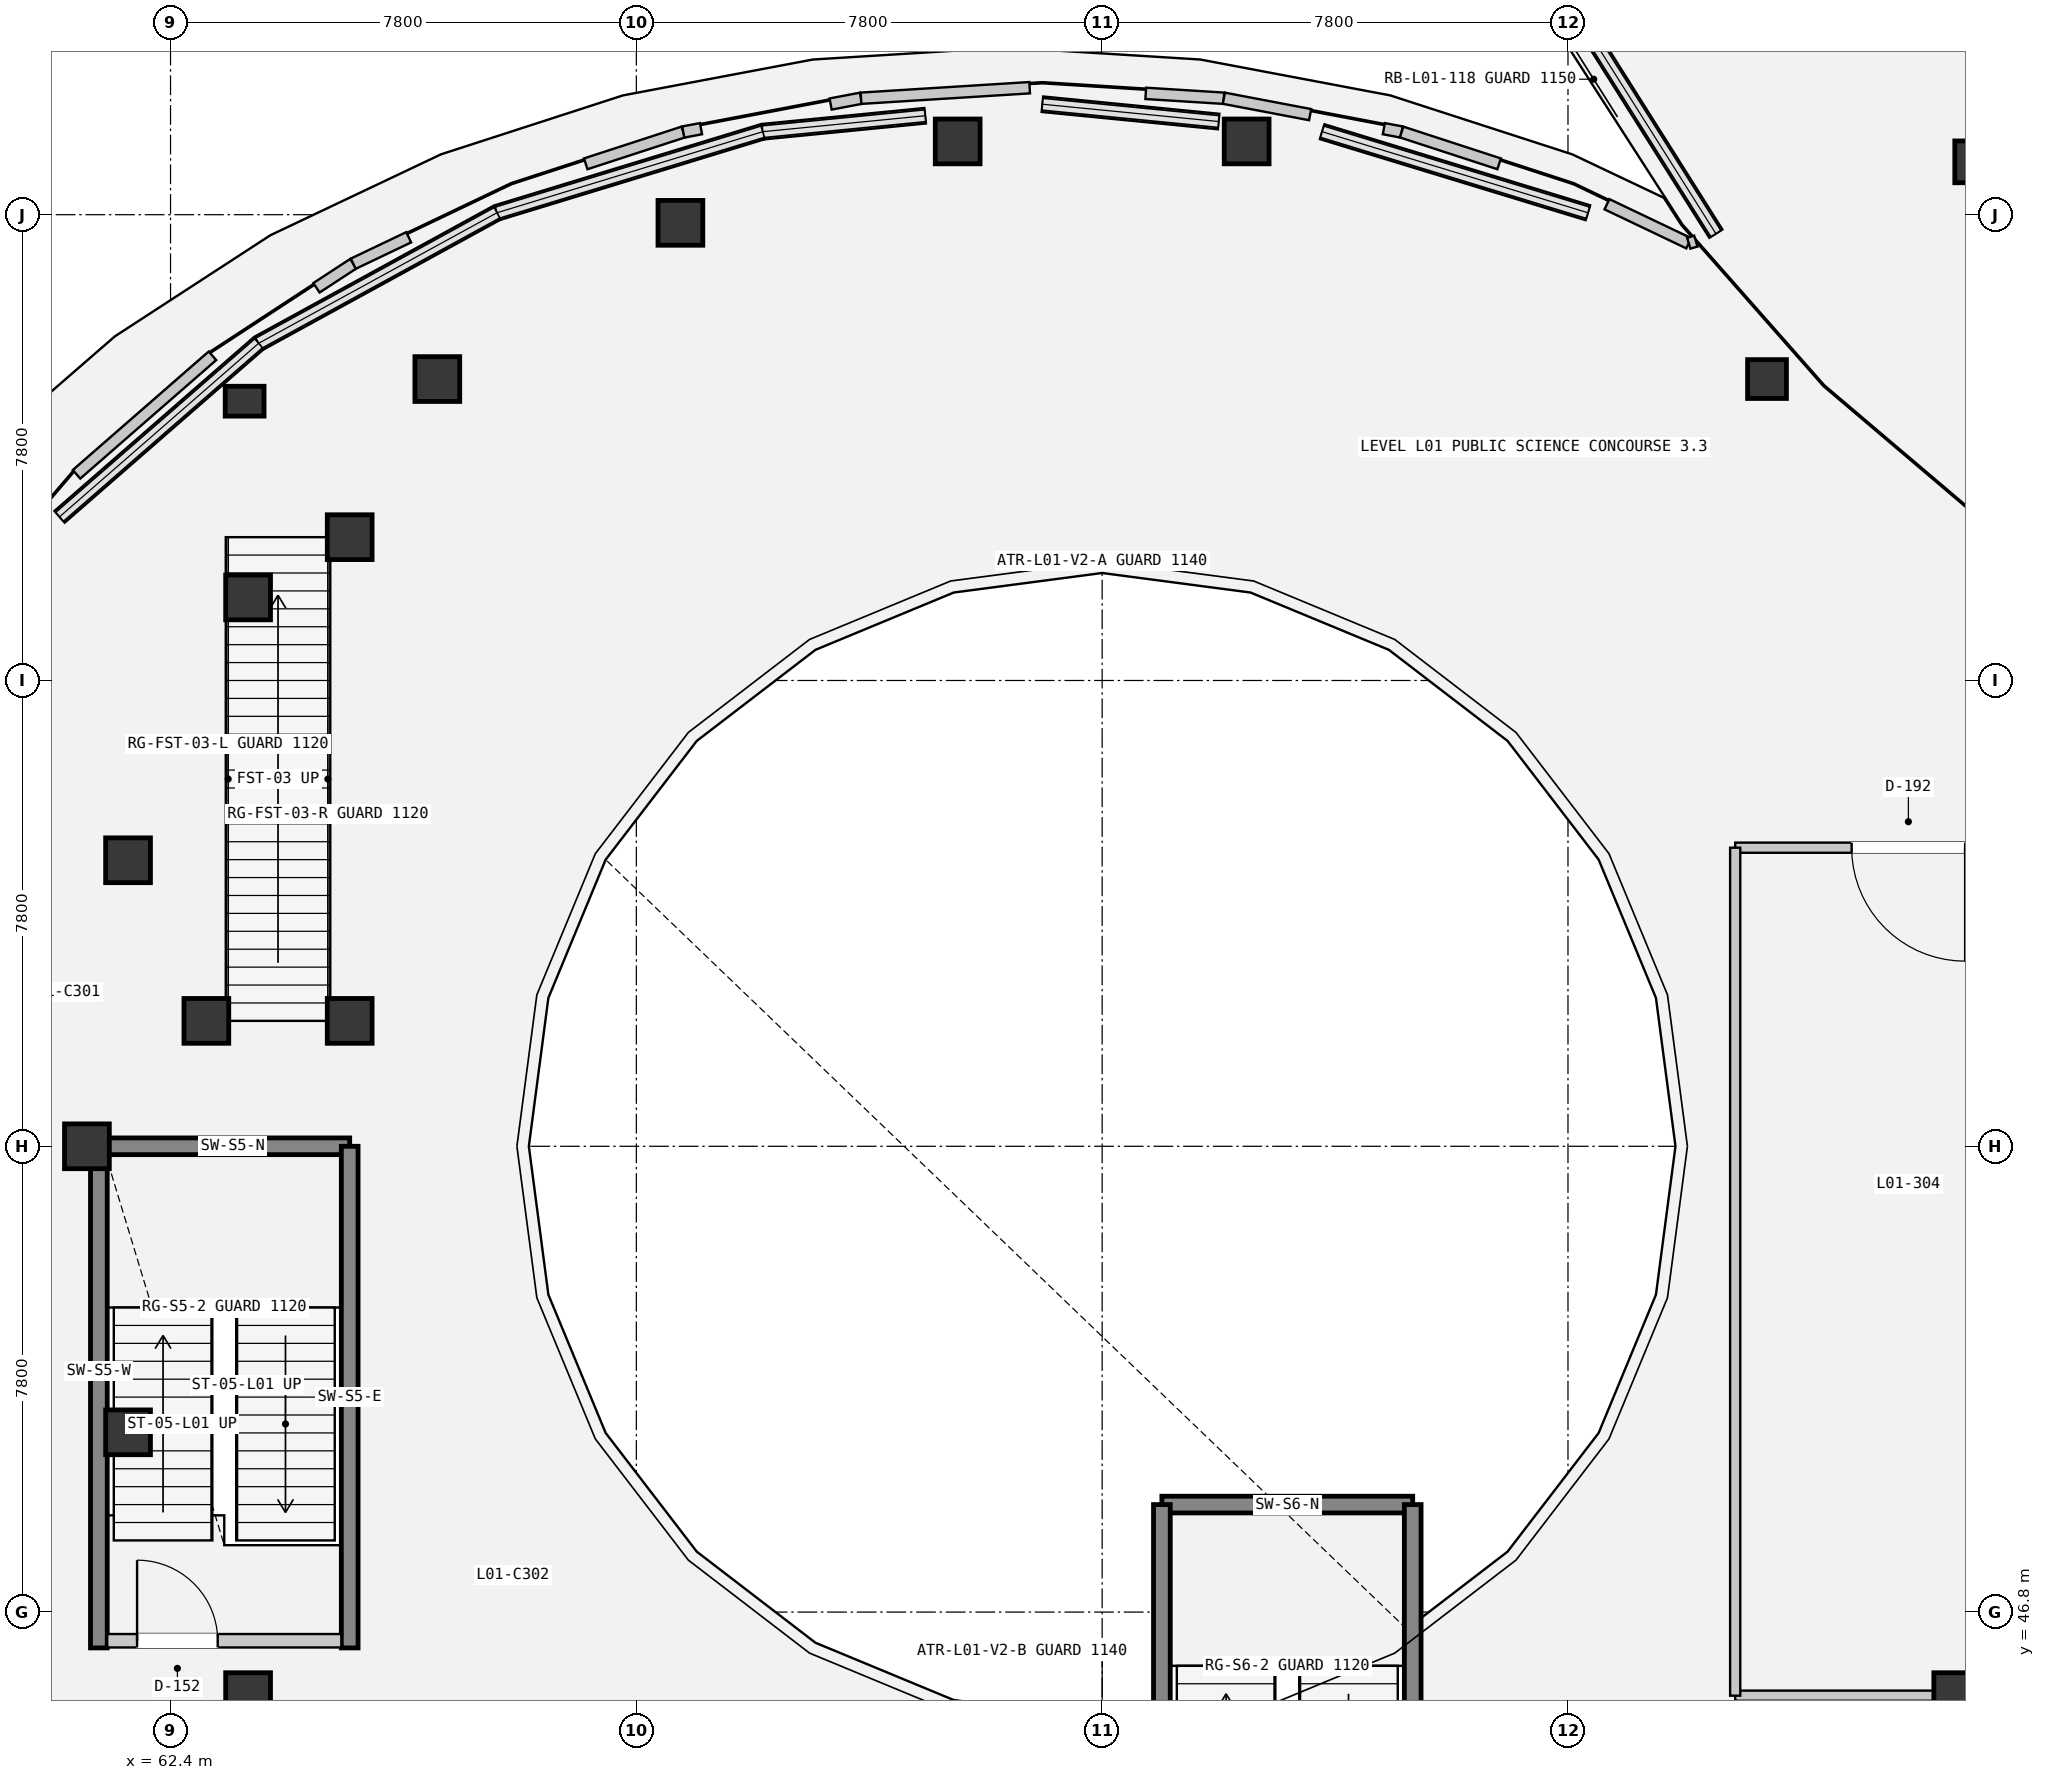
"""IFC4 building model, lengths in metres.
Left out: names, types, materials, properties, quantities, classifications, styles, units other than length and angle.
Written with IfcOpenShell. Run it as: python <this file> out.ifc"""

import sys

from ifc_helpers import new_model, si_unit, direction, frame, frame_2d, origin, origin_2d, place, context, subcontext, project, spatial, rectangle, circle, extrude, element, fill, save


model = new_model("IFC4")
c1 = context("Model", 3, precision=1e-05, world=origin(), true_north=direction((0.0, 1.0)))
c2 = subcontext(c1, "Body", "Model", "MODEL_VIEW")
j1 = project(units=[si_unit("LENGTHUNIT", "METRE"), si_unit("PLANEANGLEUNIT", "RADIAN")], contexts=[c1])
p1 = place(None, origin())
s1 = spatial("IfcSite", under=j1, at=p1, CompositionType="ELEMENT")
p2 = place(p1, origin())
s2 = spatial("IfcBuilding", under=s1, at=p2, CompositionType="ELEMENT")
p3 = place(p2, frame((0.0, 0.0, 5.4)))
s3 = spatial("IfcBuildingStorey", under=s2, at=p3, CompositionType="ELEMENT", Elevation=5.4)
p4 = place(p3, frame((89.133, 67.448, 0.0), z_axis=(0.0, 0.0, 1.0), x_axis=(1.0, 0.0, 0.0)))
e1 = element("IfcColumn", 1, at=p4, inside=s3, PredefinedType="COLUMN", context=c2, shape_type="SweptSolid", body=[
    extrude(circle(Radius=0.325, at=origin_2d()), origin(), (0.0, 0.0, 1.0), 4.8),
])
for number, where, z_axis, x_axis in (
    (2, (80.419, 71.427, 0.0), (0.0, 0.0, 1.0), (1.0, 0.0, 0.0)),
    (3, (75.581, 71.427, 0.0), (0.0, 0.0, 1.0), (1.0, 0.0, 0.0)),
    (4, (70.938, 70.064, 0.0), (0.0, 0.0, 1.0), (1.0, 0.0, 0.0)),
    (5, (66.867, 67.448, 0.0), (0.0, 0.0, 1.0), (1.0, 0.0, 0.0)),
    (6, (63.699, 63.791, 0.0), (0.0, 0.0, 1.0), (1.0, 0.0, 0.0)),
    (7, (61.689, 59.389, 0.0), (0.0, 0.0, 1.0), (1.0, 0.0, 0.0)),
    (8, (61.0, 54.6, 0.0), (0.0, 0.0, 1.0), (1.0, 0.0, 0.0)),
    (9, (61.689, 49.811, 0.0), (0.0, 0.0, 1.0), (1.0, 0.0, 0.0)),
    (10, (63.699, 45.409, 0.0), (0.0, 0.0, 1.0), (1.0, 0.0, 0.0)),
    (11, (92.301, 45.409, 0.0), (0.0, 0.0, 1.0), (1.0, 0.0, 0.0)),
):
    element("IfcColumn", number, at=place(p3, frame(where, z_axis=z_axis, x_axis=x_axis)), inside=s3, PredefinedType="COLUMN", context=c2, shape_type="SweptSolid", body=[
        extrude(circle(Radius=0.375, at=origin_2d()), origin(), (0.0, 0.0, 1.0), 4.8),
    ])
p5 = place(p3, frame((92.627, 71.085, 0.0), z_axis=(0.0, 0.0, 1.0), x_axis=(1.0, 0.0, 0.0)))
e12 = element("IfcColumn", 12, at=p5, inside=s3, PredefinedType="COLUMN", context=c2, shape_type="SweptSolid", body=[
    extrude(rectangle(XDim=0.7, YDim=0.7, at=origin_2d()), origin(), (0.0, 0.0, 1.0), 4.8),
])
p6 = place(p3, frame((63.641, 67.077, 0.0), z_axis=(0.0, 0.0, 1.0), x_axis=(1.0, 0.0, 0.0)))
e13 = element("IfcColumn", 13, at=p6, inside=s3, PredefinedType="COLUMN", context=c2, shape_type="SweptSolid", body=[
    extrude(rectangle(XDim=0.65, YDim=0.5, at=origin_2d()), origin(), (0.0, 0.0, 1.0), 4.8),
])
for number, where, z_axis, x_axis in (
    (14, (63.0, 56.7, 0.0), (0.0, 0.0, 1.0), (1.0, 0.0, 0.0)),
    (15, (65.4, 56.7, 0.0), (0.0, 0.0, 1.0), (1.0, 0.0, 0.0)),
    (16, (65.4, 64.8, 0.0), (0.0, 0.0, 1.0), (1.0, 0.0, 0.0)),
):
    element("IfcColumn", number, at=place(p3, frame(where, z_axis=z_axis, x_axis=x_axis)), inside=s3, PredefinedType="COLUMN", context=c2, shape_type="SweptSolid", body=[
        extrude(rectangle(XDim=0.75, YDim=0.75, at=origin_2d()), origin(), (0.0, 0.0, 1.0), 4.8),
    ])
p7 = place(p3, frame((61.2, 54.6, 0.0), z_axis=(0.0, 0.0, 1.0), x_axis=(1.0, 0.0, 0.0)))
e17 = element("IfcWall", 17, at=p7, inside=s3, PredefinedType="SHEAR", context=c2, shape_type="SweptSolid", body=[
    extrude(rectangle(XDim=4.2, YDim=0.28, at=frame_2d((2.1, 0.0))), origin(), (0.0, 0.0, 1.0), 4.8),
])
for number, where, z_axis, x_axis in (
    (18, (61.2, 46.2, 0.0), (0.0, 0.0, 1.0), (0.0, 1.0, 0.0)),
    (19, (65.4, 46.2, 0.0), (0.0, 0.0, 1.0), (0.0, 1.0, 0.0)),
):
    element("IfcWall", number, at=place(p3, frame(where, z_axis=z_axis, x_axis=x_axis)), inside=s3, PredefinedType="SHEAR", context=c2, shape_type="SweptSolid", body=[
        extrude(rectangle(XDim=8.4, YDim=0.28, at=frame_2d((4.2, 0.0))), origin(), (0.0, 0.0, 1.0), 4.8),
    ])
p8 = place(p3, frame((79.0, 48.6, 0.0), z_axis=(0.0, 0.0, 1.0), x_axis=(1.0, 0.0, 0.0)))
e20 = element("IfcWall", 20, at=p8, inside=s3, PredefinedType="SHEAR", context=c2, shape_type="SweptSolid", body=[
    extrude(rectangle(XDim=4.2, YDim=0.28, at=frame_2d((2.1, 0.0))), origin(), (0.0, 0.0, 1.0), 4.8),
])
for number, where, z_axis, x_axis in (
    (21, (79.0, 40.2, 0.0), (0.0, 0.0, 1.0), (0.0, 1.0, 0.0)),
    (22, (83.2, 40.2, 0.0), (0.0, 0.0, 1.0), (0.0, 1.0, 0.0)),
):
    element("IfcWall", number, at=place(p3, frame(where, z_axis=z_axis, x_axis=x_axis)), inside=s3, PredefinedType="SHEAR", context=c2, shape_type="SweptSolid", body=[
        extrude(rectangle(XDim=8.4, YDim=0.28, at=frame_2d((4.2, 0.0))), origin(), (0.0, 0.0, 1.0), 4.8),
    ])
p9 = place(p3, frame((86.133, 70.233, 0.0), z_axis=(0.0, 0.0, 1.0), x_axis=(-0.956504637963, 0.291717119063, 0.0)))
e23 = element("IfcWall", 23, at=p9, inside=s3, PredefinedType="SOLIDWALL", context=c2, shape_type="SweptSolid", body=[
    extrude(rectangle(XDim=4.652, YDim=0.26, at=frame_2d((2.326, 0.0))), origin(), (0.0, 0.0, 1.0), 1.02),
])
p10 = place(p3, frame((79.95, 71.76, 0.0), z_axis=(0.0, 0.0, 1.0), x_axis=(-0.99520858599, 0.097774589602, 0.0)))
e24 = element("IfcWall", 24, at=p10, inside=s3, PredefinedType="SOLIDWALL", context=c2, shape_type="SweptSolid", body=[
    extrude(rectangle(XDim=2.964, YDim=0.26, at=frame_2d((1.482, 0.0))), origin(), (0.0, 0.0, 1.0), 1.02),
])
p11 = place(p3, frame((75.036, 71.857, 0.0), z_axis=(0.0, 0.0, 1.0), x_axis=(-0.99520468372, -0.097814301111, 0.0)))
e25 = element("IfcWall", 25, at=p11, inside=s3, PredefinedType="SOLIDWALL", context=c2, shape_type="SweptSolid", body=[
    extrude(rectangle(XDim=2.733, YDim=0.26, at=frame_2d((1.367, 0.0))), origin(), (0.0, 0.0, 1.0), 1.02),
])
p12 = place(p3, frame((72.316, 71.59, 0.0), z_axis=(0.0, 0.0, 1.0), x_axis=(-0.956504637963, -0.291717119063, 0.0)))
e26 = element("IfcWall", 26, at=p12, inside=s3, PredefinedType="SOLIDWALL", context=c2, shape_type="SweptSolid", body=[
    extrude(rectangle(XDim=4.652, YDim=0.26, at=frame_2d((2.326, 0.0))), origin(), (0.0, 0.0, 1.0), 1.02),
])
p13 = place(p3, frame((67.867, 70.233, 0.0), z_axis=(0.0, 0.0, 1.0), x_axis=(-0.877039221063, -0.480418780562, 0.0)))
e27 = element("IfcWall", 27, at=p13, inside=s3, PredefinedType="SOLIDWALL", context=c2, shape_type="SweptSolid", body=[
    extrude(rectangle(XDim=4.551, YDim=0.26, at=frame_2d((2.275, 0.0))), origin(), (0.0, 0.0, 1.0), 1.02),
])
p14 = place(p3, frame((63.875, 68.047, 0.0), z_axis=(0.0, 0.0, 1.0), x_axis=(-0.75379306643, -0.657111872516, 0.0)))
e28 = element("IfcWall", 28, at=p14, inside=s3, PredefinedType="SOLIDWALL", context=c2, shape_type="SweptSolid", body=[
    extrude(rectangle(XDim=4.422, YDim=0.26, at=frame_2d((2.211, 0.0))), origin(), (0.0, 0.0, 1.0), 1.02),
])
p15 = place(p3, frame((85.74, 73.903, 0.0), z_axis=(0.0, 0.0, 1.0), x_axis=(0.533687611515, -0.845681697399, 0.0)))
e29 = element("IfcWall", 29, at=p15, inside=s3, PredefinedType="SOLIDWALL", context=c2, shape_type="SweptSolid", body=[
    extrude(rectangle(XDim=4.753, YDim=0.26, at=frame_2d((2.376, 0.0))), origin(), (0.0, 0.0, 1.0), 1.02),
])
p16 = place(p3, frame((61.34, 46.32, 0.0), z_axis=(0.0, 0.0, 1.0), x_axis=(1.0, 0.0, 0.0)))
e30 = element("IfcWall", 30, at=p16, inside=s3, PredefinedType="PARTITIONING", context=c2, shape_type="SweptSolid", body=[
    extrude(rectangle(XDim=3.92, YDim=0.225, at=frame_2d((1.96, 0.0))), origin(), (0.0, 0.0, 1.0), 3.51),
])
p17 = place(p16, frame((0.5, 0.0, 0.0)))
e31 = element("IfcOpeningElement", 31, at=p17, cuts=e30, PredefinedType="OPENING", context=c2, shape_type="SweptSolid", body=[
    extrude(rectangle(XDim=1.35, YDim=2.2, at=frame_2d((0.675, 1.1))), frame((0.0, 0.123, 0.0), z_axis=(0.0, -1.0, 0.0), x_axis=(1.0, 0.0, 0.0)), (0.0, 0.0, 1.0), 0.245),
])
p18 = place(p3, frame((88.6, 45.4, 0.0), z_axis=(0.0, 0.0, 1.0), x_axis=(1.0, 0.0, 0.0)))
e32 = element("IfcWall", 32, at=p18, inside=s3, PredefinedType="PARTITIONING", context=c2, shape_type="SweptSolid", body=[
    extrude(rectangle(XDim=5.8, YDim=0.17, at=frame_2d((2.9, 0.0))), origin(), (0.0, 0.0, 1.0), 3.45),
])
p19 = place(p3, frame((94.4, 59.6, 0.0), z_axis=(0.0, 0.0, 1.0), x_axis=(-1.0, 0.0, 0.0)))
e33 = element("IfcWall", 33, at=p19, inside=s3, PredefinedType="PARTITIONING", context=c2, shape_type="SweptSolid", body=[
    extrude(rectangle(XDim=5.8, YDim=0.17, at=frame_2d((2.9, 0.0))), origin(), (0.0, 0.0, 1.0), 3.45),
])
p20 = place(p19, frame((1.95, 0.0, 0.0)))
e34 = element("IfcOpeningElement", 34, at=p20, cuts=e33, PredefinedType="OPENING", context=c2, shape_type="SweptSolid", body=[
    extrude(rectangle(XDim=1.9, YDim=2.45, at=frame_2d((0.95, 1.225))), frame((0.0, 0.095, 0.0), z_axis=(0.0, -1.0, 0.0), x_axis=(1.0, 0.0, 0.0)), (0.0, 0.0, 1.0), 0.19),
])
p21 = place(p3, frame((88.6, 59.6, 0.0), z_axis=(0.0, 0.0, 1.0), x_axis=(0.0, -1.0, 0.0)))
e35 = element("IfcWall", 35, at=p21, inside=s3, PredefinedType="PARTITIONING", context=c2, shape_type="SweptSolid", body=[
    extrude(rectangle(XDim=14.2, YDim=0.17, at=frame_2d((7.1, 0.0))), origin(), (0.0, 0.0, 1.0), 3.45),
])
p22 = place(p3, frame((60.826, 65.853, 0.0), z_axis=(0.0, 0.0, 1.0), x_axis=(0.75376246126, 0.65714697899, 0.0)))
e36 = element("IfcWall", 36, at=p22, inside=s3, PredefinedType="PARAPET", context=c2, shape_type="SweptSolid", body=[
    extrude(rectangle(XDim=3.02, YDim=0.19, at=frame_2d((1.51, 0.0))), origin(), (0.0, 0.0, 1.0), 1.12),
])
p23 = place(p3, frame((64.844, 68.976, 0.0), z_axis=(0.0, 0.0, 1.0), x_axis=(0.836917016948, 0.547329797053, 0.0)))
e37 = element("IfcWall", 37, at=p23, inside=s3, PredefinedType="PARAPET", context=c2, shape_type="SweptSolid", body=[
    extrude(rectangle(XDim=0.736, YDim=0.19, at=frame_2d((0.368, 0.0))), origin(), (0.0, 0.0, 1.0), 1.12),
])
p24 = place(p3, frame((65.46, 69.379, 0.0), z_axis=(0.0, 0.0, 1.0), x_axis=(0.902443288363, 0.430808671325, 0.0)))
e38 = element("IfcWall", 38, at=p24, inside=s3, PredefinedType="PARAPET", context=c2, shape_type="SweptSolid", body=[
    extrude(rectangle(XDim=1.029, YDim=0.19, at=frame_2d((0.514, 0.0))), origin(), (0.0, 0.0, 1.0), 1.12),
])
p25 = place(p3, frame((69.353, 71.052, 0.0), z_axis=(0.0, 0.0, 1.0), x_axis=(0.950793564659, 0.309825107766, 0.0)))
e39 = element("IfcWall", 39, at=p25, inside=s3, PredefinedType="PARAPET", context=c2, shape_type="SweptSolid", body=[
    extrude(rectangle(XDim=1.718, YDim=0.19, at=frame_2d((0.859, 0.0))), origin(), (0.0, 0.0, 1.0), 1.12),
])
p26 = place(p3, frame((70.986, 71.584, 0.0), z_axis=(0.0, 0.0, 1.0), x_axis=(0.982458484281, 0.186481437854, 0.0)))
e40 = element("IfcWall", 40, at=p26, inside=s3, PredefinedType="PARAPET", context=c2, shape_type="SweptSolid", body=[
    extrude(rectangle(XDim=0.302, YDim=0.19, at=frame_2d((0.151, 0.0))), origin(), (0.0, 0.0, 1.0), 1.12),
])
p27 = place(p3, frame((73.453, 72.053, 0.0), z_axis=(0.0, 0.0, 1.0), x_axis=(0.982350935869, 0.187047156614, 0.0)))
e41 = element("IfcWall", 41, at=p27, inside=s3, PredefinedType="PARAPET", context=c2, shape_type="SweptSolid", body=[
    extrude(rectangle(XDim=0.518, YDim=0.19, at=frame_2d((0.259, 0.0))), origin(), (0.0, 0.0, 1.0), 1.12),
])
p28 = place(p3, frame((73.962, 72.15, 0.0), z_axis=(0.0, 0.0, 1.0), x_axis=(0.998057611315, 0.062297708599, 0.0)))
e42 = element("IfcWall", 42, at=p28, inside=s3, PredefinedType="PARAPET", context=c2, shape_type="SweptSolid", body=[
    extrude(rectangle(XDim=2.83, YDim=0.19, at=frame_2d((1.415, 0.0))), origin(), (0.0, 0.0, 1.0), 1.12),
])
p29 = place(p3, frame((78.73, 72.232, 0.0), z_axis=(0.0, 0.0, 1.0), x_axis=(0.998063433404, -0.062204364015, 0.0)))
e43 = element("IfcWall", 43, at=p29, inside=s3, PredefinedType="PARAPET", context=c2, shape_type="SweptSolid", body=[
    extrude(rectangle(XDim=1.311, YDim=0.19, at=frame_2d((0.655, 0.0))), origin(), (0.0, 0.0, 1.0), 1.12),
])
p30 = place(p3, frame((80.038, 72.15, 0.0), z_axis=(0.0, 0.0, 1.0), x_axis=(0.982395206125, -0.186814504207, 0.0)))
e44 = element("IfcWall", 44, at=p30, inside=s3, PredefinedType="PARAPET", context=c2, shape_type="SweptSolid", body=[
    extrude(rectangle(XDim=1.47, YDim=0.19, at=frame_2d((0.735, 0.0))), origin(), (0.0, 0.0, 1.0), 1.12),
])
p31 = place(p3, frame((82.717, 71.641, 0.0), z_axis=(0.0, 0.0, 1.0), x_axis=(0.982458484281, -0.186481437854, 0.0)))
e45 = element("IfcWall", 45, at=p31, inside=s3, PredefinedType="PARAPET", context=c2, shape_type="SweptSolid", body=[
    extrude(rectangle(XDim=0.302, YDim=0.19, at=frame_2d((0.151, 0.0))), origin(), (0.0, 0.0, 1.0), 1.12),
])
p32 = place(p3, frame((83.014, 71.584, 0.0), z_axis=(0.0, 0.0, 1.0), x_axis=(0.950793564659, -0.309825107766, 0.0)))
e46 = element("IfcWall", 46, at=p32, inside=s3, PredefinedType="PARAPET", context=c2, shape_type="SweptSolid", body=[
    extrude(rectangle(XDim=1.718, YDim=0.19, at=frame_2d((0.859, 0.0))), origin(), (0.0, 0.0, 1.0), 1.12),
])
p33 = place(p3, frame((86.453, 70.375, 0.0), z_axis=(0.0, 0.0, 1.0), x_axis=(0.902604642784, -0.43047050866, 0.0)))
e47 = element("IfcWall", 47, at=p33, inside=s3, PredefinedType="PARAPET", context=c2, shape_type="SweptSolid", body=[
    extrude(rectangle(XDim=1.518, YDim=0.19, at=frame_2d((0.759, 0.0))), origin(), (0.0, 0.0, 1.0), 1.12),
])
p34 = place(p3, frame((87.823, 69.722, 0.0), z_axis=(0.0, 0.0, 1.0), x_axis=(0.956792768287, 0.290770697549, 0.0)))
e48 = element("IfcWall", 48, at=p34, inside=s3, PredefinedType="PARAPET", context=c2, shape_type="SweptSolid", body=[
    extrude(rectangle(XDim=0.124, YDim=0.19, at=frame_2d((0.062, 0.0))), origin(), (0.0, 0.0, 1.0), 1.12),
])
p35 = place(p17, origin())
e49 = element("IfcDoor", 49, at=p35, inside=s3, OperationType="SINGLE_SWING_RIGHT", PredefinedType="DOOR", context=c2, shape_type="SweptSolid", body=[
    extrude(rectangle(XDim=1.35, YDim=2.2, at=frame_2d((0.675, 1.1))), frame((0.0, 0.025, 0.0), z_axis=(0.0, -1.0, 0.0), x_axis=(1.0, 0.0, 0.0)), (0.0, 0.0, 1.0), 0.05),
])
fill(e31, e49)
p36 = place(p20, origin())
e50 = element("IfcDoor", 50, at=p36, inside=s3, OperationType="DOUBLE_DOOR_SINGLE_SWING", PredefinedType="DOOR", context=c2, shape_type="SweptSolid", body=[
    extrude(rectangle(XDim=1.9, YDim=2.45, at=frame_2d((0.95, 1.225))), frame((0.0, 0.025, 0.0), z_axis=(0.0, -1.0, 0.0), x_axis=(1.0, 0.0, 0.0)), (0.0, 0.0, 1.0), 0.05),
])
fill(e34, e50)
save(model, sys.argv[1])
